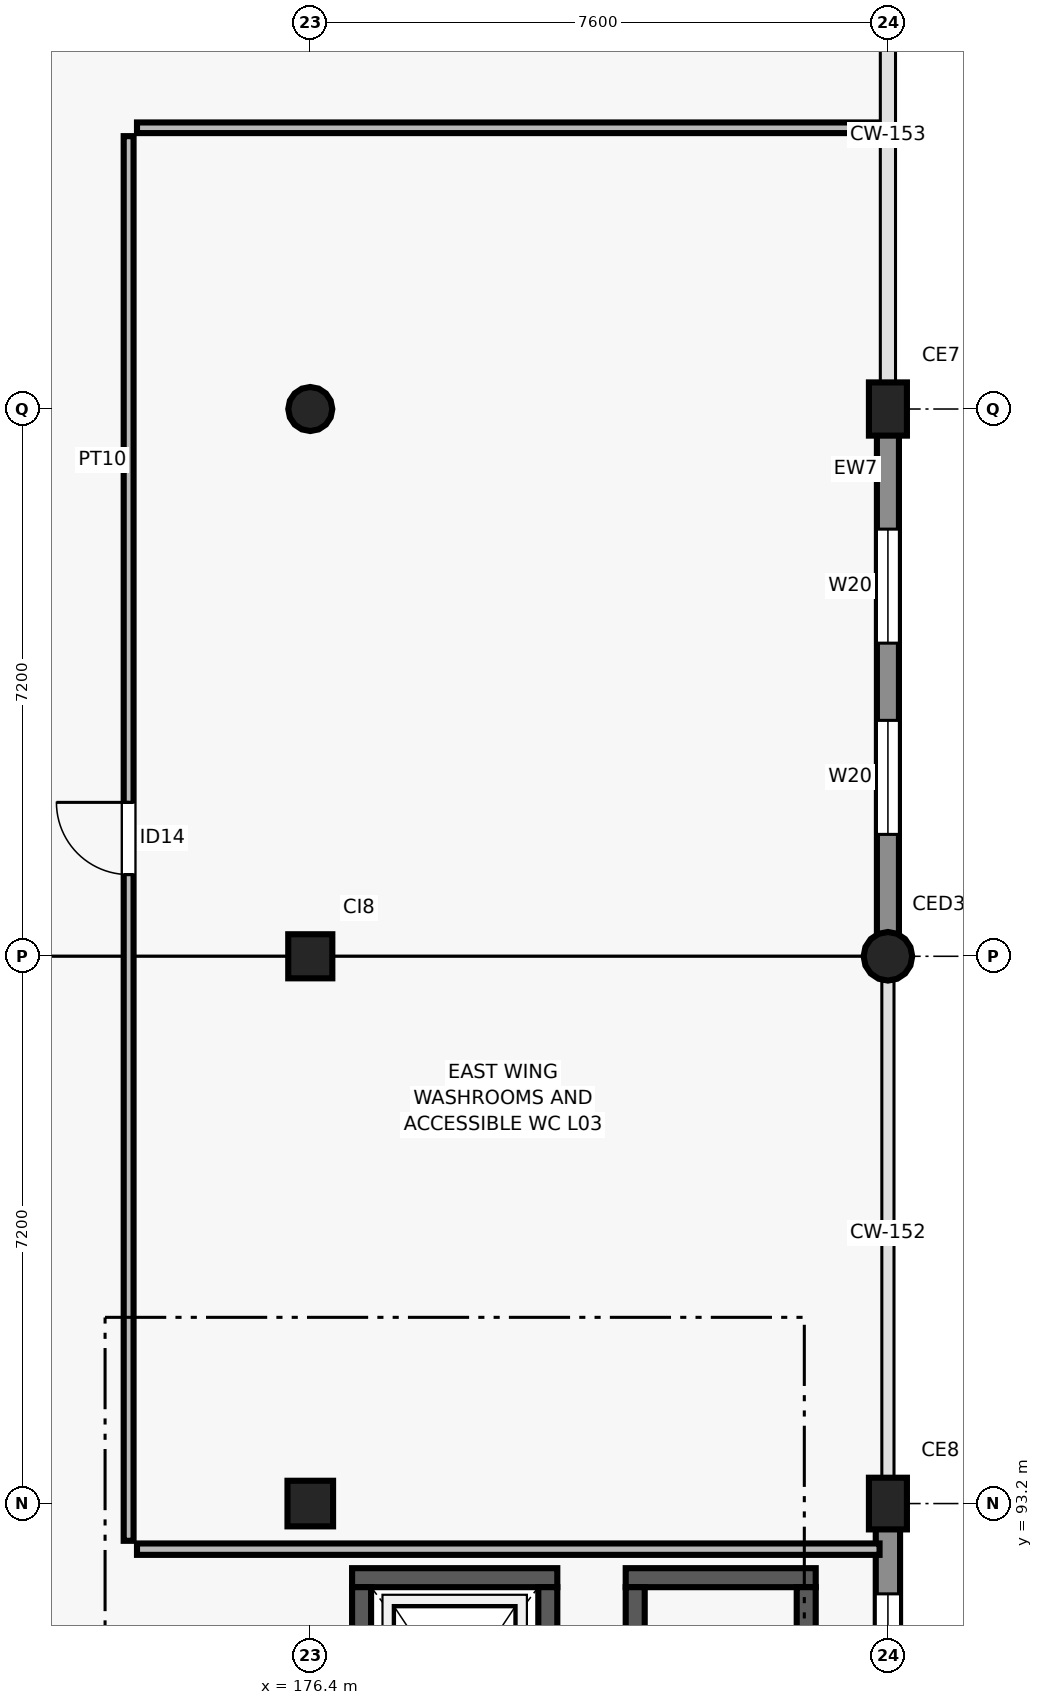
"""IFC4 building model, lengths in metres.
Left out: names, types, materials, properties, quantities, classifications, styles, units other than length and angle.
Written with IfcOpenShell. Run it as: python <this file> out.ifc"""

import sys

from ifc_helpers import new_model, si_unit, direction, frame, frame_2d, origin, origin_2d, place, context, subcontext, project, spatial, rectangle, circle, extrude, element, fill, save


model = new_model("IFC4")
c1 = context("Model", 3, precision=1e-05, world=origin(), true_north=direction((0.0, 1.0)))
c2 = subcontext(c1, "Body", "Model", "MODEL_VIEW")
j1 = project(units=[si_unit("LENGTHUNIT", "METRE"), si_unit("PLANEANGLEUNIT", "RADIAN")], contexts=[c1])
p1 = place(None, origin())
s1 = spatial("IfcSite", under=j1, at=p1, CompositionType="ELEMENT")
p2 = place(p1, origin())
s2 = spatial("IfcBuilding", under=s1, at=p2, CompositionType="ELEMENT")
p3 = place(p2, frame((0.0, 0.0, 13.2)))
s3 = spatial("IfcBuildingStorey", under=s2, at=p3, CompositionType="ELEMENT", Elevation=13.2)
p4 = place(p3, frame((176.4, 93.2, 0.0), z_axis=(0.0, 0.0, 1.0), x_axis=(1.0, 0.0, 0.0)))
e1 = element("IfcColumn", 1, at=p4, inside=s3, PredefinedType="COLUMN", context=c2, shape_type="SweptSolid", body=[
    extrude(rectangle(XDim=0.6, YDim=0.6, at=origin_2d()), origin(), (0.0, 0.0, 1.0), 4.2),
])
p5 = place(p3, frame((176.4, 100.4, 0.0), z_axis=(0.0, 0.0, 1.0), x_axis=(1.0, 0.0, 0.0)))
e2 = element("IfcColumn", 2, at=p5, inside=s3, PredefinedType="COLUMN", context=c2, shape_type="SweptSolid", body=[
    extrude(rectangle(XDim=0.58, YDim=0.58, at=origin_2d()), origin(), (0.0, 0.0, 1.0), 4.2),
])
p6 = place(p3, frame((176.4, 107.6, 0.0), z_axis=(0.0, 0.0, 1.0), x_axis=(1.0, 0.0, 0.0)))
e3 = element("IfcColumn", 3, at=p6, inside=s3, PredefinedType="COLUMN", context=c2, shape_type="SweptSolid", body=[
    extrude(circle(Radius=0.29, at=origin_2d()), origin(), (0.0, 0.0, 1.0), 4.2),
])
p7 = place(p3, frame((184.0, 93.2, 0.0), z_axis=(0.0, 0.0, 1.0), x_axis=(1.0, 0.0, 0.0)))
e4 = element("IfcColumn", 4, at=p7, inside=s3, PredefinedType="COLUMN", context=c2, shape_type="SweptSolid", body=[
    extrude(rectangle(XDim=0.68, YDim=0.5, at=origin_2d()), origin(), (0.0, 0.0, 1.0), 4.2),
])
p8 = place(p3, frame((184.0, 100.4, 0.0), z_axis=(0.0, 0.0, 1.0), x_axis=(1.0, 0.0, 0.0)))
e5 = element("IfcColumn", 5, at=p8, inside=s3, PredefinedType="COLUMN", context=c2, shape_type="SweptSolid", body=[
    extrude(circle(Radius=0.32, at=origin_2d()), origin(), (0.0, 0.0, 1.0), 4.2),
])
p9 = place(p3, frame((184.0, 107.6, 0.0), z_axis=(0.0, 0.0, 1.0), x_axis=(1.0, 0.0, 0.0)))
e6 = element("IfcColumn", 6, at=p9, inside=s3, PredefinedType="COLUMN", context=c2, shape_type="SweptSolid", body=[
    extrude(rectangle(XDim=0.7, YDim=0.5, at=origin_2d()), origin(), (0.0, 0.0, 1.0), 4.2),
])
p10 = place(p3, frame((184.0, 86.245, 0.0), z_axis=(0.0, 0.0, 1.0), x_axis=(0.0, 1.0, 0.0)))
e7 = element("IfcWall", 7, at=p10, inside=s3, PredefinedType="SOLIDWALL", context=c2, shape_type="SweptSolid", body=[
    extrude(rectangle(XDim=6.71, YDim=0.32, at=frame_2d((3.355, 0.0))), origin(), (0.0, 0.0, 1.0), 3.5),
])
p11 = place(p10, frame((0.943, 0.0, 0.9)))
e8 = element("IfcOpeningElement", 8, at=p11, cuts=e7, PredefinedType="OPENING", context=c2, shape_type="SweptSolid", body=[
    extrude(rectangle(XDim=2.1, YDim=1.25, at=frame_2d((1.05, 0.625))), frame((0.0, 0.17, 0.0), z_axis=(0.0, -1.0, 0.0), x_axis=(1.0, 0.0, 0.0)), (0.0, 0.0, 1.0), 0.34),
])
p12 = place(p10, frame((3.667, 0.0, 0.9)))
e9 = element("IfcOpeningElement", 9, at=p12, cuts=e7, PredefinedType="OPENING", context=c2, shape_type="SweptSolid", body=[
    extrude(rectangle(XDim=2.1, YDim=1.25, at=frame_2d((1.05, 0.625))), frame((0.0, 0.17, 0.0), z_axis=(0.0, -1.0, 0.0), x_axis=(1.0, 0.0, 0.0)), (0.0, 0.0, 1.0), 0.34),
])
p13 = place(p3, frame((184.0, 100.669, 0.0), z_axis=(0.0, 0.0, 1.0), x_axis=(0.0, 1.0, 0.0)))
e10 = element("IfcWall", 10, at=p13, inside=s3, PredefinedType="SOLIDWALL", context=c2, shape_type="SweptSolid", body=[
    extrude(rectangle(XDim=6.686, YDim=0.29, at=frame_2d((3.343, 0.0))), origin(), (0.0, 0.0, 1.0), 3.34),
])
p14 = place(p13, frame((1.335, 0.0, 0.9)))
e11 = element("IfcOpeningElement", 11, at=p14, cuts=e10, PredefinedType="OPENING", context=c2, shape_type="SweptSolid", body=[
    extrude(rectangle(XDim=1.5, YDim=1.25, at=frame_2d((0.75, 0.625))), frame((0.0, 0.155, 0.0), z_axis=(0.0, -1.0, 0.0), x_axis=(1.0, 0.0, 0.0)), (0.0, 0.0, 1.0), 0.31),
])
p15 = place(p13, frame((3.851, 0.0, 0.9)))
e12 = element("IfcOpeningElement", 12, at=p15, cuts=e10, PredefinedType="OPENING", context=c2, shape_type="SweptSolid", body=[
    extrude(rectangle(XDim=1.5, YDim=1.25, at=frame_2d((0.75, 0.625))), frame((0.0, 0.155, 0.0), z_axis=(0.0, -1.0, 0.0), x_axis=(1.0, 0.0, 0.0)), (0.0, 0.0, 1.0), 0.31),
])
p16 = place(p3, frame((176.95, 92.225, 0.0), z_axis=(0.0, 0.0, 1.0), x_axis=(1.0, 0.0, 0.0)))
e13 = element("IfcWall", 13, at=p16, inside=s3, PredefinedType="SHEAR", context=c2, shape_type="SweptSolid", body=[
    extrude(rectangle(XDim=2.7, YDim=0.25, at=frame_2d((1.35, 0.0))), origin(), (0.0, 0.0, 1.0), 3.92),
])
for number, where, z_axis, x_axis in (
    (14, (177.075, 89.2, 0.0), (0.0, 0.0, 1.0), (0.0, 1.0, 0.0)),
    (15, (179.525, 89.2, 0.0), (0.0, 0.0, 1.0), (0.0, 1.0, 0.0)),
):
    element("IfcWall", number, at=place(p3, frame(where, z_axis=z_axis, x_axis=x_axis)), inside=s3, PredefinedType="SHEAR", context=c2, shape_type="SweptSolid", body=[
        extrude(rectangle(XDim=2.9, YDim=0.25, at=frame_2d((1.45, 0.0))), origin(), (0.0, 0.0, 1.0), 3.92),
    ])
p17 = place(p3, frame((180.55, 92.225, 0.0), z_axis=(0.0, 0.0, 1.0), x_axis=(1.0, 0.0, 0.0)))
e16 = element("IfcWall", 16, at=p17, inside=s3, PredefinedType="SHEAR", context=c2, shape_type="SweptSolid", body=[
    extrude(rectangle(XDim=2.5, YDim=0.25, at=frame_2d((1.25, 0.0))), origin(), (0.0, 0.0, 1.0), 3.92),
])
for number, where, z_axis, x_axis in (
    (17, (180.675, 89.2, 0.0), (0.0, 0.0, 1.0), (0.0, 1.0, 0.0)),
    (18, (182.925, 89.2, 0.0), (0.0, 0.0, 1.0), (0.0, 1.0, 0.0)),
):
    element("IfcWall", number, at=place(p3, frame(where, z_axis=z_axis, x_axis=x_axis)), inside=s3, PredefinedType="SHEAR", context=c2, shape_type="SweptSolid", body=[
        extrude(rectangle(XDim=2.9, YDim=0.25, at=frame_2d((1.45, 0.0))), origin(), (0.0, 0.0, 1.0), 3.92),
    ])
p18 = place(p3, frame((174.12, 92.6, 0.0), z_axis=(0.0, 0.0, 1.0), x_axis=(1.0, 0.0, 0.0)))
e19 = element("IfcWall", 19, at=p18, inside=s3, PredefinedType="PARTITIONING", context=c2, shape_type="SweptSolid", body=[
    extrude(rectangle(XDim=9.77, YDim=0.15, at=frame_2d((4.885, 0.0))), origin(), (0.0, 0.0, 1.0), 3.9),
])
p19 = place(p3, frame((174.12, 111.3, 0.0), z_axis=(0.0, 0.0, 1.0), x_axis=(1.0, 0.0, 0.0)))
e20 = element("IfcWall", 20, at=p19, inside=s3, PredefinedType="PARTITIONING", context=c2, shape_type="SweptSolid", body=[
    extrude(rectangle(XDim=9.77, YDim=0.14, at=frame_2d((4.885, 0.0))), origin(), (0.0, 0.0, 1.0), 3.5),
])
p20 = place(p3, frame((174.01, 92.71, 0.0), z_axis=(0.0, 0.0, 1.0), x_axis=(0.0, 1.0, 0.0)))
e21 = element("IfcWall", 21, at=p20, inside=s3, PredefinedType="PARTITIONING", context=c2, shape_type="SweptSolid", body=[
    extrude(rectangle(XDim=18.48, YDim=0.13, at=frame_2d((9.24, 0.0))), origin(), (0.0, 0.0, 1.0), 3.9),
])
p21 = place(p20, frame((8.765, 0.0, 0.0)))
e22 = element("IfcOpeningElement", 22, at=p21, cuts=e21, PredefinedType="OPENING", context=c2, shape_type="SweptSolid", body=[
    extrude(rectangle(XDim=0.95, YDim=2.1, at=frame_2d((0.475, 1.05))), frame((0.0, 0.075, 0.0), z_axis=(0.0, -1.0, 0.0), x_axis=(1.0, 0.0, 0.0)), (0.0, 0.0, 1.0), 0.15),
])
p22 = place(p12, origin())
e23 = element("IfcWindow", 23, at=p22, inside=s3, PartitioningType="SINGLE_PANEL", PredefinedType="WINDOW", context=c2, shape_type="SweptSolid", body=[
    extrude(rectangle(XDim=2.1, YDim=1.25, at=frame_2d((1.05, 0.625))), frame((0.0, 0.03, 0.0), z_axis=(0.0, -1.0, 0.0), x_axis=(1.0, 0.0, 0.0)), (0.0, 0.0, 1.0), 0.06),
])
fill(e9, e23)
p23 = place(p14, origin())
e24 = element("IfcWindow", 24, at=p23, inside=s3, PartitioningType="SINGLE_PANEL", PredefinedType="WINDOW", context=c2, shape_type="SweptSolid", body=[
    extrude(rectangle(XDim=1.5, YDim=1.25, at=frame_2d((0.75, 0.625))), frame((0.0, 0.03, 0.0), z_axis=(0.0, -1.0, 0.0), x_axis=(1.0, 0.0, 0.0)), (0.0, 0.0, 1.0), 0.06),
])
fill(e11, e24)
p24 = place(p15, origin())
e25 = element("IfcWindow", 25, at=p24, inside=s3, PartitioningType="SINGLE_PANEL", PredefinedType="WINDOW", context=c2, shape_type="SweptSolid", body=[
    extrude(rectangle(XDim=1.5, YDim=1.25, at=frame_2d((0.75, 0.625))), frame((0.0, 0.03, 0.0), z_axis=(0.0, -1.0, 0.0), x_axis=(1.0, 0.0, 0.0)), (0.0, 0.0, 1.0), 0.06),
])
fill(e12, e25)
p25 = place(p21, origin())
e26 = element("IfcDoor", 26, at=p25, inside=s3, OperationType="SINGLE_SWING_RIGHT", PredefinedType="DOOR", context=c2, shape_type="SweptSolid", body=[
    extrude(rectangle(XDim=0.95, YDim=2.1, at=frame_2d((0.475, 1.05))), frame((0.0, 0.025, 0.0), z_axis=(0.0, -1.0, 0.0), x_axis=(1.0, 0.0, 0.0)), (0.0, 0.0, 1.0), 0.05),
])
fill(e22, e26)
save(model, sys.argv[1])
